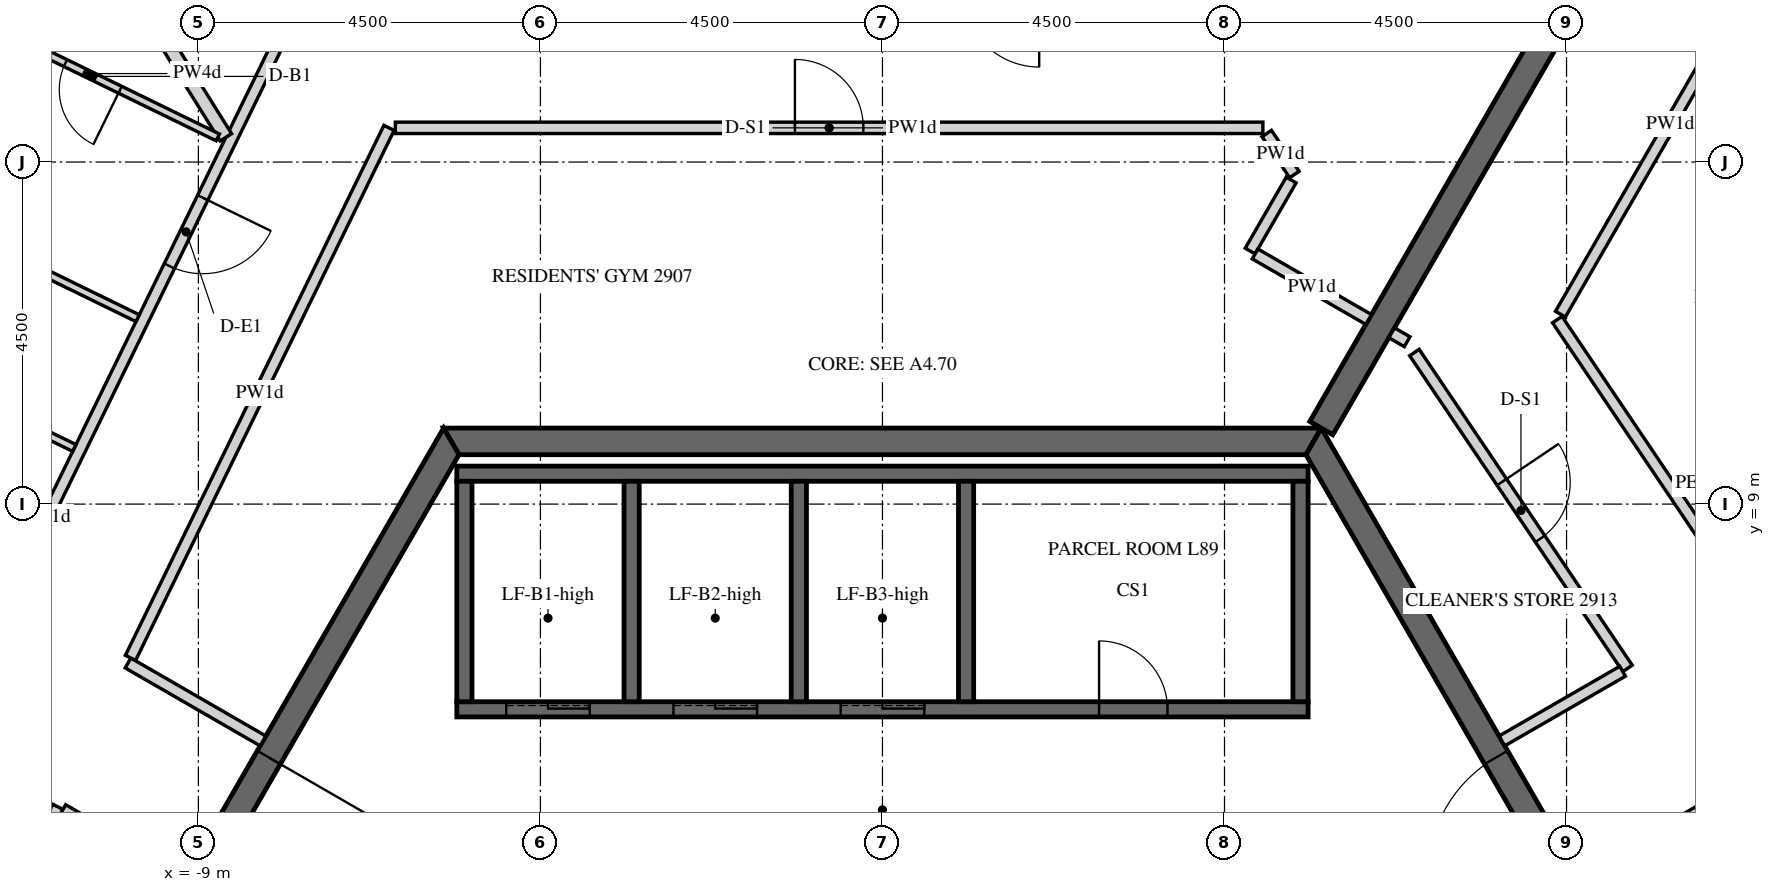
"""IFC4 building model, lengths in metres.
Left out: names, types, materials, properties, quantities, classifications, styles, units other than length and angle.
Written with IfcOpenShell. Run it as: python <this file> out.ifc"""

import sys

from ifc_helpers import new_model, si_unit, direction, frame, frame_2d, origin, place, context, subcontext, project, spatial, polyline, rectangle, outline, extrude, element, fill, save


model = new_model("IFC4")
c1 = context("Model", 3, precision=1e-05, world=origin(), true_north=direction((0.0, 1.0)))
c2 = subcontext(c1, "Body", "Model", "MODEL_VIEW")
j1 = project(units=[si_unit("LENGTHUNIT", "METRE"), si_unit("PLANEANGLEUNIT", "RADIAN")], contexts=[c1])
p1 = place(None, origin())
s1 = spatial("IfcSite", under=j1, at=p1, CompositionType="ELEMENT")
p2 = place(p1, origin())
s2 = spatial("IfcBuilding", under=s1, at=p2, CompositionType="ELEMENT")
p3 = place(p2, frame((0.0, 0.0, 369.0)))
s3 = spatial("IfcBuildingStorey", under=s2, at=p3, CompositionType="ELEMENT", Elevation=369.0)
p4 = place(p3, frame((-5.673, 9.825, -0.15), z_axis=(0.0, 0.0, 1.0), x_axis=(-0.499995046907, -0.866028263435, 0.0)))
e1 = element("IfcWall", 1, at=p4, inside=s3, PredefinedType="SHEAR", context=c2, shape_type="SweptSolid", body=[
    extrude(outline(polyline([(-0.101, -0.175), (11.446, -0.175), (11.244, 0.175), (0.101, 0.175), (-0.101, -0.175)])), origin(), (0.0, 0.0, 1.0), 3.9),
])
p5 = place(p4, frame((4.801, 0.0, 0.15)))
e2 = element("IfcOpeningElement", 2, at=p5, cuts=e1, PredefinedType="OPENING", context=c2, shape_type="SweptSolid", body=[
    extrude(rectangle(XDim=1.8, YDim=2.4, at=frame_2d((0.9, 1.2))), frame((0.0, 0.185, 0.0), z_axis=(0.0, -1.0, 0.0), x_axis=(1.0, 0.0, 0.0)), (0.0, 0.0, 1.0), 0.37),
])
p6 = place(p3, frame((11.345, 0.0, -0.15), z_axis=(0.0, 0.0, 1.0), x_axis=(-0.499995046907, 0.866028263435, 0.0)))
e3 = element("IfcWall", 3, at=p6, inside=s3, PredefinedType="SHEAR", context=c2, shape_type="SweptSolid", body=[
    extrude(outline(polyline([(-0.101, -0.175), (11.446, -0.175), (11.244, 0.175), (0.101, 0.175), (-0.101, -0.175)])), origin(), (0.0, 0.0, 1.0), 3.9),
])
p7 = place(p6, frame((4.744, 0.0, 0.15)))
e4 = element("IfcOpeningElement", 4, at=p7, cuts=e3, PredefinedType="OPENING", context=c2, shape_type="SweptSolid", body=[
    extrude(rectangle(XDim=1.8, YDim=2.4, at=frame_2d((0.9, 1.2))), frame((0.0, 0.185, 0.0), z_axis=(0.0, -1.0, 0.0), x_axis=(1.0, 0.0, 0.0)), (0.0, 0.0, 1.0), 0.37),
])
p8 = place(p3, frame((5.673, 9.825, -0.15), z_axis=(0.0, 0.0, 1.0), x_axis=(-1.0, 0.0, 0.0)))
e5 = element("IfcWall", 5, at=p8, inside=s3, PredefinedType="SHEAR", context=c2, shape_type="SweptSolid", body=[
    extrude(outline(polyline([(-0.101, -0.175), (11.446, -0.175), (11.244, 0.175), (0.101, 0.175), (-0.101, -0.175)])), origin(), (0.0, 0.0, 1.0), 3.9),
])
p9 = place(p3, frame((5.773, 10.0, -0.15), z_axis=(0.0, 0.0, 1.0), x_axis=(0.500007911273, 0.866020836161, 0.0)))
e6 = element("IfcWall", 6, at=p9, inside=s3, PredefinedType="SHEAR", context=c2, shape_type="SweptSolid", body=[
    extrude(rectangle(XDim=14.51, YDim=0.35, at=frame_2d((7.255, 0.0))), origin(), (0.0, 0.0, 1.0), 3.9),
])
p10 = place(p9, frame((6.355, 0.0, 0.15)))
e7 = element("IfcOpeningElement", 7, at=p10, cuts=e6, PredefinedType="OPENING", context=c2, shape_type="SweptSolid", body=[
    extrude(rectangle(XDim=1.8, YDim=2.4, at=frame_2d((0.9, 1.2))), frame((0.0, 0.185, 0.0), z_axis=(0.0, -1.0, 0.0), x_axis=(1.0, 0.0, 0.0)), (0.0, 0.0, 1.0), 0.37),
])
p11 = place(p3, frame((-5.6, 6.3, -0.25), z_axis=(0.0, 0.0, 1.0), x_axis=(1.0, 0.0, 0.0)))
e8 = element("IfcWall", 8, at=p11, inside=s3, PredefinedType="SHEAR", context=c2, shape_type="SweptSolid", body=[
    extrude(rectangle(XDim=11.2, YDim=0.2, at=frame_2d((5.6, 0.0))), origin(), (0.0, 0.0, 1.0), 3.9),
])
p12 = place(p11, frame((8.45, 0.0, 0.25)))
e9 = element("IfcOpeningElement", 9, at=p12, cuts=e8, PredefinedType="OPENING", context=c2, shape_type="SweptSolid", body=[
    extrude(rectangle(XDim=0.9, YDim=2.1, at=frame_2d((0.45, 1.05))), frame((0.0, 0.11, 0.0), z_axis=(0.0, -1.0, 0.0), x_axis=(1.0, 0.0, 0.0)), (0.0, 0.0, 1.0), 0.22),
])
p13 = place(p11, frame((0.65, 0.0, 0.25)))
e10 = element("IfcOpeningElement", 10, at=p13, cuts=e8, PredefinedType="OPENING", context=c2, shape_type="SweptSolid", body=[
    extrude(rectangle(XDim=1.1, YDim=2.1, at=frame_2d((0.55, 1.05))), frame((0.0, 0.11, 0.0), z_axis=(0.0, -1.0, 0.0), x_axis=(1.0, 0.0, 0.0)), (0.0, 0.0, 1.0), 0.22),
])
p14 = place(p11, frame((2.85, 0.0, 0.25)))
e11 = element("IfcOpeningElement", 11, at=p14, cuts=e8, PredefinedType="OPENING", context=c2, shape_type="SweptSolid", body=[
    extrude(rectangle(XDim=1.1, YDim=2.1, at=frame_2d((0.55, 1.05))), frame((0.0, 0.11, 0.0), z_axis=(0.0, -1.0, 0.0), x_axis=(1.0, 0.0, 0.0)), (0.0, 0.0, 1.0), 0.22),
])
p15 = place(p11, frame((5.05, 0.0, 0.25)))
e12 = element("IfcOpeningElement", 12, at=p15, cuts=e8, PredefinedType="OPENING", context=c2, shape_type="SweptSolid", body=[
    extrude(rectangle(XDim=1.1, YDim=2.1, at=frame_2d((0.55, 1.05))), frame((0.0, 0.11, 0.0), z_axis=(0.0, -1.0, 0.0), x_axis=(1.0, 0.0, 0.0)), (0.0, 0.0, 1.0), 0.22),
])
p16 = place(p3, frame((-5.6, 9.4, -0.25), z_axis=(0.0, 0.0, 1.0), x_axis=(1.0, 0.0, 0.0)))
e13 = element("IfcWall", 13, at=p16, inside=s3, PredefinedType="SHEAR", context=c2, shape_type="SweptSolid", body=[
    extrude(rectangle(XDim=11.2, YDim=0.2, at=frame_2d((5.6, 0.0))), origin(), (0.0, 0.0, 1.0), 3.9),
])
for number, where, z_axis, x_axis in (
    (14, (-5.5, 6.4, -0.25), (0.0, 0.0, 1.0), (0.0, 1.0, 0.0)),
    (15, (-3.3, 6.4, -0.25), (0.0, 0.0, 1.0), (0.0, 1.0, 0.0)),
    (16, (-1.1, 6.4, -0.25), (0.0, 0.0, 1.0), (0.0, 1.0, 0.0)),
    (17, (1.1, 6.4, -0.25), (0.0, 0.0, 1.0), (0.0, 1.0, 0.0)),
    (18, (5.5, 6.4, -0.25), (0.0, 0.0, 1.0), (0.0, 1.0, 0.0)),
):
    element("IfcWall", number, at=place(p3, frame(where, z_axis=z_axis, x_axis=x_axis)), inside=s3, PredefinedType="SHEAR", context=c2, shape_type="SweptSolid", body=[
        extrude(rectangle(XDim=2.9, YDim=0.2, at=frame_2d((1.45, 0.0))), origin(), (0.0, 0.0, 1.0), 3.9),
    ])
p17 = place(p3, frame((-7.653, 15.675, 0.0), z_axis=(0.0, 0.0, 1.0), x_axis=(-0.438369669055, -0.898794767037, 0.0)))
e19 = element("IfcWall", 19, at=p17, inside=s3, PredefinedType="PARTITIONING", context=c2, shape_type="SweptSolid", body=[
    extrude(rectangle(XDim=15.243, YDim=0.15, at=frame_2d((7.621, 0.0))), origin(), (0.0, 0.0, 1.0), 2.47),
])
p18 = place(p17, frame((2.942, 0.0, 0.0)))
e20 = element("IfcOpeningElement", 20, at=p18, cuts=e19, PredefinedType="OPENING", context=c2, shape_type="SweptSolid", body=[
    extrude(rectangle(XDim=1.0, YDim=2.1, at=frame_2d((0.5, 1.05))), frame((0.0, 0.085, 0.0), z_axis=(0.0, -1.0, 0.0), x_axis=(1.0, 0.0, 0.0)), (0.0, 0.0, 1.0), 0.17),
])
p19 = place(p3, frame((-8.15, 5.884, 0.0), z_axis=(0.0, 0.0, 1.0), x_axis=(-0.866007146345, 0.50003162148, 0.0)))
e21 = element("IfcWall", 21, at=p19, inside=s3, PredefinedType="PARTITIONING", context=c2, shape_type="SweptSolid", body=[
    extrude(rectangle(XDim=2.051, YDim=0.15, at=frame_2d((1.025, 0.0))), origin(), (0.0, 0.0, 1.0), 2.47),
])
p20 = place(p3, frame((-9.893, 6.977, 0.0), z_axis=(0.0, 0.0, 1.0), x_axis=(0.438380229518, 0.898789616299, 0.0)))
e22 = element("IfcWall", 22, at=p20, inside=s3, PredefinedType="PARTITIONING", context=c2, shape_type="SweptSolid", body=[
    extrude(rectangle(XDim=7.758, YDim=0.15, at=frame_2d((3.879, 0.0))), origin(), (0.0, 0.0, 1.0), 2.47),
])
p21 = place(p3, frame((-6.408, 13.95, 0.0), z_axis=(0.0, 0.0, 1.0), x_axis=(1.0, 0.0, 0.0)))
e23 = element("IfcWall", 23, at=p21, inside=s3, PredefinedType="PARTITIONING", context=c2, shape_type="SweptSolid", body=[
    extrude(rectangle(XDim=11.413, YDim=0.15, at=frame_2d((5.707, 0.0))), origin(), (0.0, 0.0, 1.0), 2.47),
])
p22 = place(p21, frame((5.257, 0.0, 0.0)))
e24 = element("IfcOpeningElement", 24, at=p22, cuts=e23, PredefinedType="OPENING", context=c2, shape_type="SweptSolid", body=[
    extrude(rectangle(XDim=0.9, YDim=2.1, at=frame_2d((0.45, 1.05))), frame((0.0, 0.085, 0.0), z_axis=(0.0, -1.0, 0.0), x_axis=(1.0, 0.0, 0.0)), (0.0, 0.0, 1.0), 0.17),
])
p23 = place(p3, frame((5.055, 13.875, 0.0), z_axis=(0.0, 0.0, 1.0), x_axis=(0.559111656251, -0.829092368705, 0.0)))
e25 = element("IfcWall", 25, at=p23, inside=s3, PredefinedType="PARTITIONING", context=c2, shape_type="SweptSolid", body=[
    extrude(rectangle(XDim=0.65, YDim=0.15, at=frame_2d((0.325, 0.0))), origin(), (0.0, 0.0, 1.0), 2.47),
])
p24 = place(p3, frame((5.377, 13.264, 0.0), z_axis=(0.0, 0.0, 1.0), x_axis=(-0.499957341738, -0.866050031143, 0.0)))
e26 = element("IfcWall", 26, at=p24, inside=s3, PredefinedType="PARTITIONING", context=c2, shape_type="SweptSolid", body=[
    extrude(rectangle(XDim=1.08, YDim=0.15, at=frame_2d((0.54, 0.0))), origin(), (0.0, 0.0, 1.0), 2.47),
])
p25 = place(p3, frame((4.902, 12.291, 0.0), z_axis=(0.0, 0.0, 1.0), x_axis=(0.866074815912, -0.499914405916, 0.0)))
e27 = element("IfcWall", 27, at=p25, inside=s3, PredefinedType="PARTITIONING", context=c2, shape_type="SweptSolid", body=[
    extrude(rectangle(XDim=1.725, YDim=0.15, at=frame_2d((0.862, 0.0))), origin(), (0.0, 0.0, 1.0), 2.47),
])
p26 = place(p3, frame((-13.021, 0.564, 0.0), z_axis=(0.0, 0.0, 1.0), x_axis=(0.438343062662, 0.8988077433, 0.0)))
e28 = element("IfcWall", 28, at=p26, inside=s3, PredefinedType="PARTITIONING", context=c2, shape_type="SweptSolid", body=[
    extrude(rectangle(XDim=4.955, YDim=0.15, at=frame_2d((2.478, 0.0))), origin(), (0.0, 0.0, 1.0), 2.47),
])
p27 = place(p26, frame((2.028, 0.0, 0.0)))
e29 = element("IfcOpeningElement", 29, at=p27, cuts=e28, PredefinedType="OPENING", context=c2, shape_type="SweptSolid", body=[
    extrude(rectangle(XDim=0.9, YDim=2.1, at=frame_2d((0.45, 1.05))), frame((0.0, 0.085, 0.0), z_axis=(0.0, -1.0, 0.0), x_axis=(1.0, 0.0, 0.0)), (0.0, 0.0, 1.0), 0.17),
])
p28 = place(p3, frame((-10.783, 4.98, 0.0), z_axis=(0.0, 0.0, 1.0), x_axis=(0.866007702746, -0.500030657845, 0.0)))
e30 = element("IfcWall", 30, at=p28, inside=s3, PredefinedType="PARTITIONING", context=c2, shape_type="SweptSolid", body=[
    extrude(rectangle(XDim=1.829, YDim=0.15, at=frame_2d((0.914, 0.0))), origin(), (0.0, 0.0, 1.0), 2.47),
])
p29 = place(p3, frame((17.401, -1.21, 0.0), z_axis=(0.0, 0.0, 1.0), x_axis=(-0.559186729505, 0.829041736914, 0.0)))
e31 = element("IfcWall", 31, at=p29, inside=s3, PredefinedType="PARTITIONING", context=c2, shape_type="SweptSolid", body=[
    extrude(rectangle(XDim=15.243, YDim=0.15, at=frame_2d((7.621, 0.0))), origin(), (0.0, 0.0, 1.0), 2.47),
])
p30 = place(p29, frame((5.802, 0.0, 0.0)))
e32 = element("IfcOpeningElement", 32, at=p30, cuts=e31, PredefinedType="OPENING", context=c2, shape_type="SweptSolid", body=[
    extrude(rectangle(XDim=1.0, YDim=2.1, at=frame_2d((0.5, 1.05))), frame((0.0, 0.085, 0.0), z_axis=(0.0, -1.0, 0.0), x_axis=(1.0, 0.0, 0.0)), (0.0, 0.0, 1.0), 0.17),
])
p31 = place(p3, frame((8.92, 11.499, 0.0), z_axis=(0.0, 0.0, 1.0), x_axis=(0.499984314267, 0.866034459757, 0.0)))
e33 = element("IfcWall", 33, at=p31, inside=s3, PredefinedType="PARTITIONING", context=c2, shape_type="SweptSolid", body=[
    extrude(rectangle(XDim=5.784, YDim=0.15, at=frame_2d((2.892, 0.0))), origin(), (0.0, 0.0, 1.0), 2.47),
])
p32 = place(p3, frame((9.2, 4.066, 0.0), z_axis=(0.0, 0.0, 1.0), x_axis=(0.866011447264, 0.500024172624, 0.0)))
e34 = element("IfcWall", 34, at=p32, inside=s3, PredefinedType="PARTITIONING", context=c2, shape_type="SweptSolid", body=[
    extrude(rectangle(XDim=2.055, YDim=0.15, at=frame_2d((1.027, 0.0))), origin(), (0.0, 0.0, 1.0), 2.47),
])
p33 = place(p3, frame((6.699, 11.254, 0.0), z_axis=(0.0, 0.0, 1.0), x_axis=(0.865544827262, -0.500831460673, 0.0)))
e35 = element("IfcWall", 35, at=p33, inside=s3, PredefinedType="PARTITIONING", context=c2, shape_type="SweptSolid", body=[
    extrude(rectangle(XDim=0.235, YDim=0.15, at=frame_2d((0.117, 0.0))), origin(), (0.0, 0.0, 1.0), 2.47),
])
p34 = place(p3, frame((6.999, 10.994, 0.0), z_axis=(0.0, 0.0, 1.0), x_axis=(0.55918759866, -0.82904115067, 0.0)))
e36 = element("IfcWall", 36, at=p34, inside=s3, PredefinedType="PARTITIONING", context=c2, shape_type="SweptSolid", body=[
    extrude(rectangle(XDim=5.013, YDim=0.15, at=frame_2d((2.506, 0.0))), origin(), (0.0, 0.0, 1.0), 2.47),
])
p35 = place(p34, frame((2.057, 0.0, 0.0)))
e37 = element("IfcOpeningElement", 37, at=p35, cuts=e36, PredefinedType="OPENING", context=c2, shape_type="SweptSolid", body=[
    extrude(rectangle(XDim=0.9, YDim=2.1, at=frame_2d((0.45, 1.05))), frame((0.0, 0.085, 0.0), z_axis=(0.0, -1.0, 0.0), x_axis=(1.0, 0.0, 0.0)), (0.0, 0.0, 1.0), 0.17),
])
p36 = place(p3, frame((9.737, 6.801, 0.0), z_axis=(0.0, 0.0, 1.0), x_axis=(-0.866045829247, -0.499964620392, 0.0)))
e38 = element("IfcWall", 38, at=p36, inside=s3, PredefinedType="PARTITIONING", context=c2, shape_type="SweptSolid", body=[
    extrude(rectangle(XDim=1.833, YDim=0.15, at=frame_2d((0.917, 0.0))), origin(), (0.0, 0.0, 1.0), 2.47),
])
p37 = place(p3, frame((-10.402, 16.647, 0.0), z_axis=(0.0, 0.0, 1.0), x_axis=(0.529853827573, -0.84808898201, 0.0)))
e39 = element("IfcWall", 39, at=p37, inside=s3, PredefinedType="PARTITIONING", context=c2, shape_type="SweptSolid", body=[
    extrude(rectangle(XDim=3.327, YDim=0.18, at=frame_2d((1.664, 0.0))), origin(), (0.0, 0.0, 1.0), 2.47),
])
p38 = place(p3, frame((-10.632, 9.738, 0.0), z_axis=(0.0, 0.0, 1.0), x_axis=(-0.898787574002, 0.438384416717, 0.0)))
e40 = element("IfcWall", 40, at=p38, inside=s3, PredefinedType="PARTITIONING", context=c2, shape_type="SweptSolid", body=[
    extrude(rectangle(XDim=3.925, YDim=0.1, at=frame_2d((1.962, 0.0))), origin(), (0.0, 0.0, 1.0), 2.47),
])
p39 = place(p3, frame((-13.327, 13.167, 0.0), z_axis=(0.0, 0.0, 1.0), x_axis=(0.898812080899, -0.438334168449, 0.0)))
e41 = element("IfcWall", 41, at=p39, inside=s3, PredefinedType="PARTITIONING", context=c2, shape_type="SweptSolid", body=[
    extrude(rectangle(XDim=3.925, YDim=0.1, at=frame_2d((1.962, 0.0))), origin(), (0.0, 0.0, 1.0), 2.47),
])
p40 = place(p39, frame((1.6, 0.0, 0.0)))
e42 = element("IfcOpeningElement", 42, at=p40, cuts=e41, PredefinedType="OPENING", context=c2, shape_type="SweptSolid", body=[
    extrude(rectangle(XDim=0.8, YDim=2.1, at=frame_2d((0.4, 1.05))), frame((0.0, 0.06, 0.0), z_axis=(0.0, -1.0, 0.0), x_axis=(1.0, 0.0, 0.0)), (0.0, 0.0, 1.0), 0.12),
])
p41 = place(p3, frame((-8.745, 13.824, 0.0), z_axis=(0.0, 0.0, 1.0), x_axis=(-0.898794787177, 0.43836962776, 0.0)))
e43 = element("IfcWall", 43, at=p41, inside=s3, PredefinedType="PARTITIONING", context=c2, shape_type="SweptSolid", body=[
    extrude(rectangle(XDim=3.83, YDim=0.1, at=frame_2d((1.915, 0.0))), origin(), (0.0, 0.0, 1.0), 2.47),
])
p42 = place(p41, frame((1.43, 0.0, 0.0)))
e44 = element("IfcOpeningElement", 44, at=p42, cuts=e43, PredefinedType="OPENING", context=c2, shape_type="SweptSolid", body=[
    extrude(rectangle(XDim=0.8, YDim=2.1, at=frame_2d((0.4, 1.05))), frame((0.0, 0.06, 0.0), z_axis=(0.0, -1.0, 0.0), x_axis=(1.0, 0.0, 0.0)), (0.0, 0.0, 1.0), 0.12),
])
p43 = place(p5, origin())
e45 = element("IfcDoor", 45, at=p43, inside=s3, OperationType="DOUBLE_DOOR_SINGLE_SWING", PredefinedType="DOOR", context=c2, shape_type="SweptSolid", body=[
    extrude(rectangle(XDim=1.8, YDim=2.4, at=frame_2d((0.9, 1.2))), frame((0.0, 0.025, 0.0), z_axis=(0.0, -1.0, 0.0), x_axis=(1.0, 0.0, 0.0)), (0.0, 0.0, 1.0), 0.05),
])
fill(e2, e45)
p44 = place(p7, origin())
e46 = element("IfcDoor", 46, at=p44, inside=s3, OperationType="DOUBLE_DOOR_SINGLE_SWING", PredefinedType="DOOR", context=c2, shape_type="SweptSolid", body=[
    extrude(rectangle(XDim=1.8, YDim=2.4, at=frame_2d((0.9, 1.2))), frame((0.0, 0.025, 0.0), z_axis=(0.0, -1.0, 0.0), x_axis=(1.0, 0.0, 0.0)), (0.0, 0.0, 1.0), 0.05),
])
fill(e4, e46)
p45 = place(p12, origin())
e47 = element("IfcDoor", 47, at=p45, inside=s3, OperationType="SINGLE_SWING_LEFT", PredefinedType="DOOR", context=c2, shape_type="SweptSolid", body=[
    extrude(rectangle(XDim=0.9, YDim=2.1, at=frame_2d((0.45, 1.05))), frame((0.0, 0.025, 0.0), z_axis=(0.0, -1.0, 0.0), x_axis=(1.0, 0.0, 0.0)), (0.0, 0.0, 1.0), 0.05),
])
fill(e9, e47)
p46 = place(p13, origin())
e48 = element("IfcDoor", 48, at=p46, inside=s3, OperationType="SLIDING_TO_LEFT", PredefinedType="DOOR", context=c2, shape_type="SweptSolid", body=[
    extrude(rectangle(XDim=1.1, YDim=2.1, at=frame_2d((0.55, 1.05))), frame((0.0, 0.025, 0.0), z_axis=(0.0, -1.0, 0.0), x_axis=(1.0, 0.0, 0.0)), (0.0, 0.0, 1.0), 0.05),
])
fill(e10, e48)
p47 = place(p14, origin())
e49 = element("IfcDoor", 49, at=p47, inside=s3, OperationType="SLIDING_TO_LEFT", PredefinedType="DOOR", context=c2, shape_type="SweptSolid", body=[
    extrude(rectangle(XDim=1.1, YDim=2.1, at=frame_2d((0.55, 1.05))), frame((0.0, 0.025, 0.0), z_axis=(0.0, -1.0, 0.0), x_axis=(1.0, 0.0, 0.0)), (0.0, 0.0, 1.0), 0.05),
])
fill(e11, e49)
p48 = place(p15, origin())
e50 = element("IfcDoor", 50, at=p48, inside=s3, OperationType="SLIDING_TO_LEFT", PredefinedType="DOOR", context=c2, shape_type="SweptSolid", body=[
    extrude(rectangle(XDim=1.1, YDim=2.1, at=frame_2d((0.55, 1.05))), frame((0.0, 0.025, 0.0), z_axis=(0.0, -1.0, 0.0), x_axis=(1.0, 0.0, 0.0)), (0.0, 0.0, 1.0), 0.05),
])
fill(e12, e50)
p49 = place(p18, origin())
e51 = element("IfcDoor", 51, at=p49, inside=s3, OperationType="SINGLE_SWING_RIGHT", PredefinedType="DOOR", context=c2, shape_type="SweptSolid", body=[
    extrude(rectangle(XDim=1.0, YDim=2.1, at=frame_2d((0.5, 1.05))), frame((0.0, 0.025, 0.0), z_axis=(0.0, -1.0, 0.0), x_axis=(1.0, 0.0, 0.0)), (0.0, 0.0, 1.0), 0.05),
])
fill(e20, e51)
p50 = place(p42, origin())
e52 = element("IfcDoor", 52, at=p50, inside=s3, OperationType="SINGLE_SWING_RIGHT", PredefinedType="DOOR", context=c2, shape_type="SweptSolid", body=[
    extrude(rectangle(XDim=0.8, YDim=2.1, at=frame_2d((0.4, 1.05))), frame((0.0, 0.025, 0.0), z_axis=(0.0, -1.0, 0.0), x_axis=(1.0, 0.0, 0.0)), (0.0, 0.0, 1.0), 0.05),
])
fill(e44, e52)
p51 = place(p22, origin())
e53 = element("IfcDoor", 53, at=p51, inside=s3, OperationType="SINGLE_SWING_RIGHT", PredefinedType="DOOR", context=c2, shape_type="SweptSolid", body=[
    extrude(rectangle(XDim=0.9, YDim=2.1, at=frame_2d((0.45, 1.05))), frame((0.0, 0.025, 0.0), z_axis=(0.0, -1.0, 0.0), x_axis=(1.0, 0.0, 0.0)), (0.0, 0.0, 1.0), 0.05),
])
fill(e24, e53)
p52 = place(p35, origin())
e54 = element("IfcDoor", 54, at=p52, inside=s3, OperationType="SINGLE_SWING_RIGHT", PredefinedType="DOOR", context=c2, shape_type="SweptSolid", body=[
    extrude(rectangle(XDim=0.9, YDim=2.1, at=frame_2d((0.45, 1.05))), frame((0.0, 0.025, 0.0), z_axis=(0.0, -1.0, 0.0), x_axis=(1.0, 0.0, 0.0)), (0.0, 0.0, 1.0), 0.05),
])
fill(e37, e54)
save(model, sys.argv[1])
